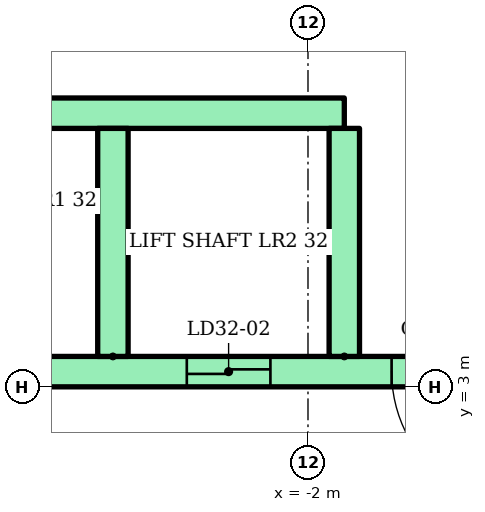
"""IFC4 building model, lengths in metres.
Left out: names, types, materials, properties, quantities, classifications, styles, units other than length and angle.
Written with IfcOpenShell. Run it as: python <this file> out.ifc"""

import sys

from ifc_helpers import new_model, si_unit, direction, frame, frame_2d, origin, place, context, subcontext, project, spatial, rectangle, extrude, element, fill, save


model = new_model("IFC4")
c1 = context("Model", 3, precision=1e-05, world=origin(), true_north=direction((0.0, 1.0)))
c2 = subcontext(c1, "Body", "Model", "MODEL_VIEW")
j1 = project(units=[si_unit("LENGTHUNIT", "METRE"), si_unit("PLANEANGLEUNIT", "RADIAN")], contexts=[c1])
p1 = place(None, origin())
s1 = spatial("IfcSite", under=j1, at=p1, CompositionType="ELEMENT")
p2 = place(p1, origin())
s2 = spatial("IfcBuilding", under=s1, at=p2, CompositionType="ELEMENT")
p3 = place(p2, frame((0.0, 0.0, 126.2)))
s3 = spatial("IfcBuildingStorey", under=s2, at=p3, CompositionType="ELEMENT", Elevation=126.2)
p4 = place(p3, frame((-13.5, 3.2, 0.0)))
e1 = element("IfcWall", 1, at=p4, inside=s3, PredefinedType="SHEAR", context=c2, shape_type="SweptSolid", body=[
    extrude(rectangle(XDim=27.0, YDim=0.4, at=frame_2d((13.5, 0.0))), origin(), (0.0, 0.0, 1.0), 2.92),
])
p5 = place(p4, frame((6.861, 0.0, 0.0)))
e2 = element("IfcOpeningElement", 2, at=p5, cuts=e1, PredefinedType="OPENING", context=c2, shape_type="SweptSolid", body=[
    extrude(rectangle(XDim=1.1, YDim=2.1, at=frame_2d((0.55, 1.05))), frame((0.0, 0.21, 0.0), z_axis=(0.0, -1.0, 0.0), x_axis=(1.0, 0.0, 0.0)), (0.0, 0.0, 1.0), 0.42),
])
p6 = place(p4, frame((9.906, 0.0, 0.0)))
e3 = element("IfcOpeningElement", 3, at=p6, cuts=e1, PredefinedType="OPENING", context=c2, shape_type="SweptSolid", body=[
    extrude(rectangle(XDim=1.1, YDim=2.1, at=frame_2d((0.55, 1.05))), frame((0.0, 0.21, 0.0), z_axis=(0.0, -1.0, 0.0), x_axis=(1.0, 0.0, 0.0)), (0.0, 0.0, 1.0), 0.42),
])
p7 = place(p4, frame((15.994, 0.0, 0.0)))
e4 = element("IfcOpeningElement", 4, at=p7, cuts=e1, PredefinedType="OPENING", context=c2, shape_type="SweptSolid", body=[
    extrude(rectangle(XDim=1.1, YDim=2.1, at=frame_2d((0.55, 1.05))), frame((0.0, 0.21, 0.0), z_axis=(0.0, -1.0, 0.0), x_axis=(1.0, 0.0, 0.0)), (0.0, 0.0, 1.0), 0.42),
])
p8 = place(p4, frame((19.039, 0.0, 0.0)))
e5 = element("IfcOpeningElement", 5, at=p8, cuts=e1, PredefinedType="OPENING", context=c2, shape_type="SweptSolid", body=[
    extrude(rectangle(XDim=1.1, YDim=2.1, at=frame_2d((0.55, 1.05))), frame((0.0, 0.21, 0.0), z_axis=(0.0, -1.0, 0.0), x_axis=(1.0, 0.0, 0.0)), (0.0, 0.0, 1.0), 0.42),
])
p9 = place(p4, frame((12.6, 0.0, 0.0)))
e6 = element("IfcOpeningElement", 6, at=p9, cuts=e1, PredefinedType="OPENING", context=c2, shape_type="SweptSolid", body=[
    extrude(rectangle(XDim=1.8, YDim=2.1, at=frame_2d((0.9, 1.05))), frame((0.0, 0.21, 0.0), z_axis=(0.0, -1.0, 0.0), x_axis=(1.0, 0.0, 0.0)), (0.0, 0.0, 1.0), 0.42),
])
p10 = place(p3, frame((-13.5, 6.6, 0.0)))
e7 = element("IfcWall", 7, at=p10, inside=s3, PredefinedType="SHEAR", context=c2, shape_type="SweptSolid", body=[
    extrude(rectangle(XDim=11.978, YDim=0.4, at=frame_2d((5.989, 0.0))), origin(), (0.0, 0.0, 1.0), 2.92),
])
for number, where, z_axis, x_axis in (
    (8, (-4.567, 3.4, 0.0), (0.0, 0.0, 1.0), (0.0, 1.0, 0.0)),
    (9, (-1.522, 3.4, 0.0), (0.0, 0.0, 1.0), (0.0, 1.0, 0.0)),
):
    element("IfcWall", number, at=place(p3, frame(where, z_axis=z_axis, x_axis=x_axis)), inside=s3, PredefinedType="SHEAR", context=c2, shape_type="SweptSolid", body=[
        extrude(rectangle(XDim=3.0, YDim=0.4, at=frame_2d((1.5, 0.0))), origin(), (0.0, 0.0, 1.0), 2.92),
    ])
p11 = place(p6, origin())
e10 = element("IfcDoor", 10, at=p11, inside=s3, OperationType="SLIDING_TO_LEFT", PredefinedType="DOOR", context=c2, shape_type="SweptSolid", body=[
    extrude(rectangle(XDim=1.1, YDim=2.1, at=frame_2d((0.55, 1.05))), frame((0.0, 0.025, 0.0), z_axis=(0.0, -1.0, 0.0), x_axis=(1.0, 0.0, 0.0)), (0.0, 0.0, 1.0), 0.05),
])
fill(e3, e10)
p12 = place(p9, frame((1.8, 0.0, 0.0), z_axis=(0.0, 0.0, 1.0), x_axis=(-1.0, 0.0, 0.0)))
e11 = element("IfcDoor", 11, at=p12, inside=s3, OperationType="DOUBLE_DOOR_SINGLE_SWING", PredefinedType="DOOR", context=c2, shape_type="SweptSolid", body=[
    extrude(rectangle(XDim=1.8, YDim=2.1, at=frame_2d((0.9, 1.05))), frame((0.0, 0.025, 0.0), z_axis=(0.0, -1.0, 0.0), x_axis=(1.0, 0.0, 0.0)), (0.0, 0.0, 1.0), 0.05),
])
fill(e6, e11)
save(model, sys.argv[1])
